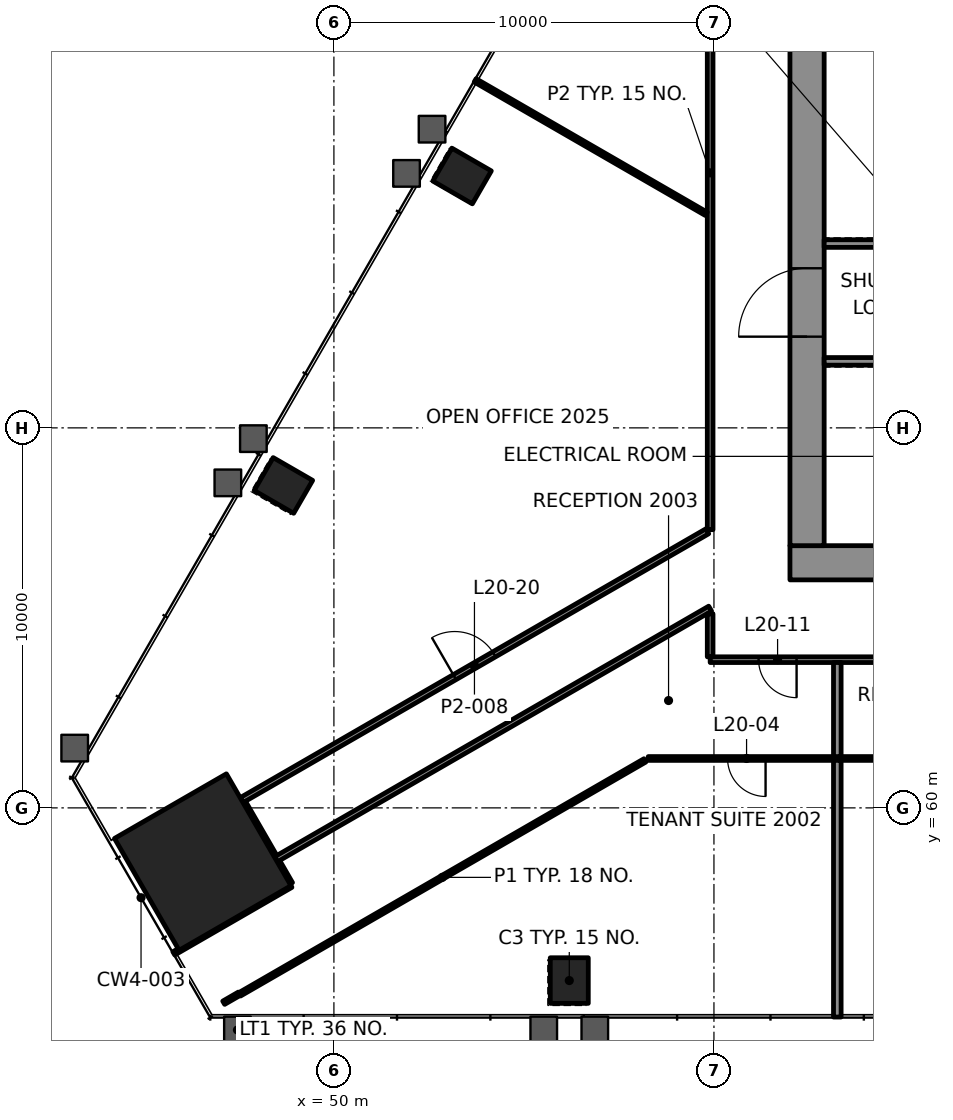
"""IFC4 building model, lengths in metres.
Left out: names, types, materials, properties, quantities, classifications, styles, units other than length and angle.
Written with IfcOpenShell. Run it as: python <this file> out.ifc"""

import sys

from ifc_helpers import new_model, si_unit, direction, frame, frame_2d, origin, origin_2d, place, context, subcontext, project, spatial, rectangle, extrude, element, fill, save


model = new_model("IFC4")
c1 = context("Model", 3, precision=1e-05, world=origin(), true_north=direction((0.0, 1.0)))
c2 = subcontext(c1, "Body", "Model", "MODEL_VIEW")
j1 = project(units=[si_unit("LENGTHUNIT", "METRE"), si_unit("PLANEANGLEUNIT", "RADIAN")], contexts=[c1])
p1 = place(None, origin())
s1 = spatial("IfcSite", under=j1, at=p1, CompositionType="ELEMENT")
p2 = place(p1, origin())
s2 = spatial("IfcBuilding", under=s1, at=p2, CompositionType="ELEMENT")
p3 = place(p2, frame((0.0, 0.0, 90.4)))
s3 = spatial("IfcBuildingStorey", under=s2, at=p3, CompositionType="ELEMENT", Elevation=90.4)
p4 = place(p3, frame((46.549, 58.574, 0.0), z_axis=(0.0, 0.0, 1.0), x_axis=(0.5, -0.866025403784, 0.0)))
e1 = element("IfcColumn", 1, at=p4, inside=s3, PredefinedType="COLUMN", context=c2, shape_type="SweptSolid", body=[
    extrude(rectangle(XDim=3.4, YDim=3.4, at=origin_2d()), origin(), (0.0, 0.0, 1.0), 4.2),
])
for number, where, z_axis, x_axis in (
    (2, (56.193, 55.456, -0.0), (0.0, 0.0, 1.0), (1.0, 0.0, 0.0)),
    (3, (53.373, 76.628, -0.0), (0.0, 0.0, 1.0), (-0.5, -0.866, 0.0)),
    (4, (48.671, 68.485, -0.0), (0.0, 0.0, 1.0), (-0.5, -0.866, 0.0)),
):
    element("IfcColumn", number, at=place(p3, frame(where, z_axis=z_axis, x_axis=x_axis)), inside=s3, PredefinedType="COLUMN", context=c2, shape_type="SweptSolid", body=[
        extrude(rectangle(XDim=1.0, YDim=1.2, at=origin_2d()), origin(), (0.0, 0.0, 1.0), 4.2),
    ])
p5 = place(p3, frame((62.0, 66.45, 0.0), z_axis=(0.0, 0.0, 1.0), x_axis=(1.0, 0.0, 0.0)))
e5 = element("IfcWall", 5, at=p5, inside=s3, PredefinedType="SHEAR", context=c2, shape_type="SweptSolid", body=[
    extrude(rectangle(XDim=26.0, YDim=0.9, at=frame_2d((13.0, 0.0))), origin(), (0.0, 0.0, 1.0), 4.0),
])
p6 = place(p5, frame((3.45, 0.0, 0.0)))
e6 = element("IfcOpeningElement", 6, at=p6, cuts=e5, PredefinedType="OPENING", context=c2, shape_type="SweptSolid", body=[
    extrude(rectangle(XDim=0.9, YDim=2.1, at=frame_2d((0.45, 1.05))), frame((0.0, 0.46, 0.0), z_axis=(0.0, -1.0, 0.0), x_axis=(1.0, 0.0, 0.0)), (0.0, 0.0, 1.0), 0.92),
])
p7 = place(p5, frame((6.425, 0.0, 0.0)))
e7 = element("IfcOpeningElement", 7, at=p7, cuts=e5, PredefinedType="OPENING", context=c2, shape_type="SweptSolid", body=[
    extrude(rectangle(XDim=0.9, YDim=2.1, at=frame_2d((0.45, 1.05))), frame((0.0, 0.46, 0.0), z_axis=(0.0, -1.0, 0.0), x_axis=(1.0, 0.0, 0.0)), (0.0, 0.0, 1.0), 0.92),
])
p8 = place(p5, frame((9.4, 0.0, 0.0)))
e8 = element("IfcOpeningElement", 8, at=p8, cuts=e5, PredefinedType="OPENING", context=c2, shape_type="SweptSolid", body=[
    extrude(rectangle(XDim=0.9, YDim=2.1, at=frame_2d((0.45, 1.05))), frame((0.0, 0.46, 0.0), z_axis=(0.0, -1.0, 0.0), x_axis=(1.0, 0.0, 0.0)), (0.0, 0.0, 1.0), 0.92),
])
p9 = place(p5, frame((14.262, 0.0, 0.0)))
e9 = element("IfcOpeningElement", 9, at=p9, cuts=e5, PredefinedType="OPENING", context=c2, shape_type="SweptSolid", body=[
    extrude(rectangle(XDim=0.9, YDim=2.1, at=frame_2d((0.45, 1.05))), frame((0.0, 0.46, 0.0), z_axis=(0.0, -1.0, 0.0), x_axis=(1.0, 0.0, 0.0)), (0.0, 0.0, 1.0), 0.92),
])
p10 = place(p5, frame((21.188, 0.0, 0.0)))
e10 = element("IfcOpeningElement", 10, at=p10, cuts=e5, PredefinedType="OPENING", context=c2, shape_type="SweptSolid", body=[
    extrude(rectangle(XDim=0.9, YDim=2.1, at=frame_2d((0.45, 1.05))), frame((0.0, 0.46, 0.0), z_axis=(0.0, -1.0, 0.0), x_axis=(1.0, 0.0, 0.0)), (0.0, 0.0, 1.0), 0.92),
])
p11 = place(p3, frame((62.45, 66.9, 0.0), z_axis=(0.0, 0.0, 1.0), x_axis=(0.0, 1.0, 0.0)))
e11 = element("IfcWall", 11, at=p11, inside=s3, PredefinedType="SHEAR", context=c2, shape_type="SweptSolid", body=[
    extrude(rectangle(XDim=16.2, YDim=0.9, at=frame_2d((8.1, 0.0))), origin(), (0.0, 0.0, 1.0), 4.0),
])
p12 = place(p11, frame((5.5, 0.0, 0.0)))
e12 = element("IfcOpeningElement", 12, at=p12, cuts=e11, PredefinedType="OPENING", context=c2, shape_type="SweptSolid", body=[
    extrude(rectangle(XDim=1.8, YDim=2.1, at=frame_2d((0.9, 1.05))), frame((0.0, 0.46, 0.0), z_axis=(0.0, -1.0, 0.0), x_axis=(1.0, 0.0, 0.0)), (0.0, 0.0, 1.0), 0.92),
])
p13 = place(p3, frame((84.403, 61.3, 0.0), z_axis=(0.0, 0.0, 1.0), x_axis=(-1.0, 0.0, 0.0)))
e13 = element("IfcWall", 13, at=p13, inside=s3, PredefinedType="PARTITIONING", context=c2, shape_type="SweptSolid", body=[
    extrude(rectangle(XDim=26.132, YDim=0.1, at=frame_2d((13.066, 0.0))), origin(), (0.0, 0.0, 1.0), 3.4),
])
p14 = place(p13, frame((2.59, 0.0, 0.0)))
e14 = element("IfcOpeningElement", 14, at=p14, cuts=e13, PredefinedType="OPENING", context=c2, shape_type="SweptSolid", body=[
    extrude(rectangle(XDim=0.9, YDim=2.1, at=frame_2d((0.45, 1.05))), frame((0.0, 0.06, 0.0), z_axis=(0.0, -1.0, 0.0), x_axis=(1.0, 0.0, 0.0)), (0.0, 0.0, 1.0), 0.12),
])
p15 = place(p13, frame((8.364, 0.0, 0.0)))
e15 = element("IfcOpeningElement", 15, at=p15, cuts=e13, PredefinedType="OPENING", context=c2, shape_type="SweptSolid", body=[
    extrude(rectangle(XDim=0.9, YDim=2.1, at=frame_2d((0.45, 1.05))), frame((0.0, 0.06, 0.0), z_axis=(0.0, -1.0, 0.0), x_axis=(1.0, 0.0, 0.0)), (0.0, 0.0, 1.0), 0.12),
])
p16 = place(p13, frame((15.956, 0.0, 0.0)))
e16 = element("IfcOpeningElement", 16, at=p16, cuts=e13, PredefinedType="OPENING", context=c2, shape_type="SweptSolid", body=[
    extrude(rectangle(XDim=1.0, YDim=2.1, at=frame_2d((0.5, 1.05))), frame((0.0, 0.06, 0.0), z_axis=(0.0, -1.0, 0.0), x_axis=(1.0, 0.0, 0.0)), (0.0, 0.0, 1.0), 0.12),
])
p17 = place(p13, frame((23.045, 0.0, 0.0)))
e17 = element("IfcOpeningElement", 17, at=p17, cuts=e13, PredefinedType="OPENING", context=c2, shape_type="SweptSolid", body=[
    extrude(rectangle(XDim=1.0, YDim=2.1, at=frame_2d((0.5, 1.05))), frame((0.0, 0.06, 0.0), z_axis=(0.0, -1.0, 0.0), x_axis=(1.0, 0.0, 0.0)), (0.0, 0.0, 1.0), 0.12),
])
p18 = place(p3, frame((90.1, 63.9, 0.0), z_axis=(0.0, 0.0, 1.0), x_axis=(-1.0, 0.0, 0.0)))
e18 = element("IfcWall", 18, at=p18, inside=s3, PredefinedType="PARTITIONING", context=c2, shape_type="SweptSolid", body=[
    extrude(rectangle(XDim=30.2, YDim=0.15, at=frame_2d((15.1, 0.0))), origin(), (0.0, 0.0, 1.0), 3.4),
])
p19 = place(p18, frame((2.35, 0.0, 0.0)))
e19 = element("IfcOpeningElement", 19, at=p19, cuts=e18, PredefinedType="OPENING", context=c2, shape_type="SweptSolid", body=[
    extrude(rectangle(XDim=1.2, YDim=2.1, at=frame_2d((0.6, 1.05))), frame((0.0, 0.085, 0.0), z_axis=(0.0, -1.0, 0.0), x_axis=(1.0, 0.0, 0.0)), (0.0, 0.0, 1.0), 0.17),
])
p20 = place(p18, frame((11.074, 0.0, 0.0)))
e20 = element("IfcOpeningElement", 20, at=p20, cuts=e18, PredefinedType="OPENING", context=c2, shape_type="SweptSolid", body=[
    extrude(rectangle(XDim=1.0, YDim=2.1, at=frame_2d((0.5, 1.05))), frame((0.0, 0.085, 0.0), z_axis=(0.0, -1.0, 0.0), x_axis=(1.0, 0.0, 0.0)), (0.0, 0.0, 1.0), 0.17),
])
p21 = place(p18, frame((21.653, 0.0, 0.0)))
e21 = element("IfcOpeningElement", 21, at=p21, cuts=e18, PredefinedType="OPENING", context=c2, shape_type="SweptSolid", body=[
    extrude(rectangle(XDim=1.0, YDim=2.1, at=frame_2d((0.5, 1.05))), frame((0.0, 0.085, 0.0), z_axis=(0.0, -1.0, 0.0), x_axis=(1.0, 0.0, 0.0)), (0.0, 0.0, 1.0), 0.17),
])
p22 = place(p18, frame((27.925, 0.0, 0.0)))
e22 = element("IfcOpeningElement", 22, at=p22, cuts=e18, PredefinedType="OPENING", context=c2, shape_type="SweptSolid", body=[
    extrude(rectangle(XDim=1.0, YDim=2.1, at=frame_2d((0.5, 1.05))), frame((0.0, 0.085, 0.0), z_axis=(0.0, -1.0, 0.0), x_axis=(1.0, 0.0, 0.0)), (0.0, 0.0, 1.0), 0.17),
])
p23 = place(p3, frame((47.519, 55.093, 0.0), z_axis=(0.0, 0.0, 1.0), x_axis=(0.866028767292, 0.499994174189, 0.0)))
e23 = element("IfcWall", 23, at=p23, inside=s3, PredefinedType="PARTITIONING", context=c2, shape_type="SweptSolid", body=[
    extrude(rectangle(XDim=12.315, YDim=0.1, at=frame_2d((6.157, 0.0))), origin(), (0.0, 0.0, 1.0), 3.4),
])
p24 = place(p3, frame((47.1, 54.873, 0.0), z_axis=(0.0, 0.0, 1.0), x_axis=(0.865944638795, 0.50013986298, 0.0)))
e24 = element("IfcWall", 24, at=p24, inside=s3, PredefinedType="PARTITIONING", context=c2, shape_type="SweptSolid", body=[
    extrude(rectangle(XDim=0.472, YDim=0.1, at=frame_2d((0.236, 0.0))), origin(), (0.0, 0.0, 1.0), 3.4),
])
p25 = place(p3, frame((45.788, 56.171, 0.0), z_axis=(0.0, 0.0, 1.0), x_axis=(0.866031398331, 0.499989616998, 0.0)))
e25 = element("IfcWall", 25, at=p25, inside=s3, PredefinedType="PARTITIONING", context=c2, shape_type="SweptSolid", body=[
    extrude(rectangle(XDim=3.56, YDim=0.1, at=frame_2d((1.78, 0.0))), origin(), (0.0, 0.0, 1.0), 3.4),
])
p26 = place(p3, frame((48.471, 58.644, 0.0), z_axis=(0.0, 0.0, 1.0), x_axis=(0.86602138367, 0.500006962977, 0.0)))
e26 = element("IfcWall", 26, at=p26, inside=s3, PredefinedType="PARTITIONING", context=c2, shape_type="SweptSolid", body=[
    extrude(rectangle(XDim=13.197, YDim=0.15, at=frame_2d((6.599, 0.0))), origin(), (0.0, 0.0, 1.0), 3.247),
])
p27 = place(p3, frame((47.571, 60.203, 0.0), z_axis=(0.0, 0.0, 1.0), x_axis=(0.866023815059, 0.500002751744, 0.0)))
e27 = element("IfcWall", 27, at=p27, inside=s3, PredefinedType="PARTITIONING", context=c2, shape_type="SweptSolid", body=[
    extrude(rectangle(XDim=14.149, YDim=0.15, at=frame_2d((7.075, 0.0))), origin(), (0.0, 0.0, 1.0), 3.4),
])
p28 = place(p27, frame((6.475, 0.0, 0.0)))
e28 = element("IfcOpeningElement", 28, at=p28, cuts=e27, PredefinedType="OPENING", context=c2, shape_type="SweptSolid", body=[
    extrude(rectangle(XDim=1.2, YDim=2.1, at=frame_2d((0.6, 1.05))), frame((0.0, 0.085, 0.0), z_axis=(0.0, -1.0, 0.0), x_axis=(1.0, 0.0, 0.0)), (0.0, 0.0, 1.0), 0.17),
])
p29 = place(p3, frame((63.246, 54.496, 0.0), z_axis=(0.0, 0.0, 1.0), x_axis=(0.0, 1.0, 0.0)))
e29 = element("IfcWall", 29, at=p29, inside=s3, PredefinedType="PARTITIONING", context=c2, shape_type="SweptSolid", body=[
    extrude(rectangle(XDim=6.754, YDim=0.2, at=frame_2d((3.377, 0.0))), origin(), (0.0, 0.0, 1.0), 3.165),
])
p30 = place(p3, frame((59.9, 63.976, 0.0), z_axis=(0.0, 0.0, 1.0), x_axis=(0.0, 1.0, 0.0)))
e30 = element("IfcWall", 30, at=p30, inside=s3, PredefinedType="PARTITIONING", context=c2, shape_type="SweptSolid", body=[
    extrude(rectangle(XDim=1.131, YDim=0.15, at=frame_2d((0.565, 0.0))), origin(), (0.0, 0.0, 1.0), 3.247),
])
p31 = place(p3, frame((59.9, 67.321, 0.0), z_axis=(0.0, 0.0, 1.0), x_axis=(0.0, 1.0, 0.0)))
e31 = element("IfcWall", 31, at=p31, inside=s3, PredefinedType="PARTITIONING", context=c2, shape_type="SweptSolid", body=[
    extrude(rectangle(XDim=18.778, YDim=0.15, at=frame_2d((9.389, 0.0))), origin(), (0.0, 0.0, 1.0), 3.4),
])
p32 = place(p3, frame((48.845, 57.995, 0.0), z_axis=(0.0, 0.0, 1.0), x_axis=(-0.499837337514, 0.866119296648, 0.0)))
e32 = element("IfcWall", 32, at=p32, inside=s3, PredefinedType="PARTITIONING", context=c2, shape_type="SweptSolid", body=[
    extrude(rectangle(XDim=0.675, YDim=0.15, at=frame_2d((0.337, 0.0))), origin(), (0.0, 0.0, 1.0), 3.4),
])
p33 = place(p3, frame((59.799, 75.632, 0.0), z_axis=(0.0, 0.0, 1.0), x_axis=(-0.866018287837, 0.500012324981, 0.0)))
e33 = element("IfcWall", 33, at=p33, inside=s3, PredefinedType="PARTITIONING", context=c2, shape_type="SweptSolid", body=[
    extrude(rectangle(XDim=7.023, YDim=0.1, at=frame_2d((3.512, 0.0))), origin(), (0.0, 0.0, 1.0), 3.165),
])
p34 = place(p3, frame((48.433, 58.709, 0.0), z_axis=(0.0, 0.0, 1.0), x_axis=(-0.500055614084, 0.865993292597, 0.0)))
e34 = element("IfcWall", 34, at=p34, inside=s3, PredefinedType="PARTITIONING", context=c2, shape_type="SweptSolid", body=[
    extrude(rectangle(XDim=1.649, YDim=0.15, at=frame_2d((0.825, 0.0))), origin(), (0.0, 0.0, 1.0), 3.247),
])
p35 = place(p3, frame((63.246, 61.35, 0.0), z_axis=(0.0, 0.0, 1.0), x_axis=(0.0, 1.0, 0.0)))
e35 = element("IfcWall", 35, at=p35, inside=s3, PredefinedType="PARTITIONING", context=c2, shape_type="SweptSolid", body=[
    extrude(rectangle(XDim=2.475, YDim=0.2, at=frame_2d((1.237, 0.0))), origin(), (0.0, 0.0, 1.0), 3.4),
])
for number, where, z_axis, x_axis in (
    (36, (62.9, 71.75, 0.0), (0.0, 0.0, 1.0), (1.0, 0.0, 0.0)),
    (37, (62.9, 74.85, 0.0), (0.0, 0.0, 1.0), (1.0, 0.0, 0.0)),
):
    element("IfcWall", number, at=place(p3, frame(where, z_axis=z_axis, x_axis=x_axis)), inside=s3, PredefinedType="PARTITIONING", context=c2, shape_type="SweptSolid", body=[
        extrude(rectangle(XDim=1.45, YDim=0.2, at=frame_2d((0.725, 0.0))), origin(), (0.0, 0.0, 1.0), 4.0),
    ])
p36 = place(p17, origin())
e38 = element("IfcDoor", 38, at=p36, inside=s3, OperationType="SINGLE_SWING_RIGHT", PredefinedType="DOOR", context=c2, shape_type="SweptSolid", body=[
    extrude(rectangle(XDim=1.0, YDim=2.1, at=frame_2d((0.5, 1.05))), frame((0.0, 0.025, 0.0), z_axis=(0.0, -1.0, 0.0), x_axis=(1.0, 0.0, 0.0)), (0.0, 0.0, 1.0), 0.05),
])
fill(e17, e38)
p37 = place(p22, origin())
e39 = element("IfcDoor", 39, at=p37, inside=s3, OperationType="SINGLE_SWING_LEFT", PredefinedType="DOOR", context=c2, shape_type="SweptSolid", body=[
    extrude(rectangle(XDim=1.0, YDim=2.1, at=frame_2d((0.5, 1.05))), frame((0.0, 0.025, 0.0), z_axis=(0.0, -1.0, 0.0), x_axis=(1.0, 0.0, 0.0)), (0.0, 0.0, 1.0), 0.05),
])
fill(e22, e39)
p38 = place(p28, origin())
e40 = element("IfcDoor", 40, at=p38, inside=s3, OperationType="DOUBLE_DOOR_SINGLE_SWING", PredefinedType="DOOR", context=c2, shape_type="SweptSolid", body=[
    extrude(rectangle(XDim=1.2, YDim=2.1, at=frame_2d((0.6, 1.05))), frame((0.0, 0.025, 0.0), z_axis=(0.0, -1.0, 0.0), x_axis=(1.0, 0.0, 0.0)), (0.0, 0.0, 1.0), 0.05),
])
fill(e28, e40)
p39 = place(p12, origin())
e41 = element("IfcDoor", 41, at=p39, inside=s3, OperationType="SINGLE_SWING_LEFT", PredefinedType="DOOR", context=c2, shape_type="SweptSolid", body=[
    extrude(rectangle(XDim=1.8, YDim=2.1, at=frame_2d((0.9, 1.05))), frame((0.0, 0.17, 0.0), z_axis=(0.0, -1.0, 0.0), x_axis=(1.0, 0.0, 0.0)), (0.0, 0.0, 1.0), 0.34),
])
fill(e12, e41)
save(model, sys.argv[1])
